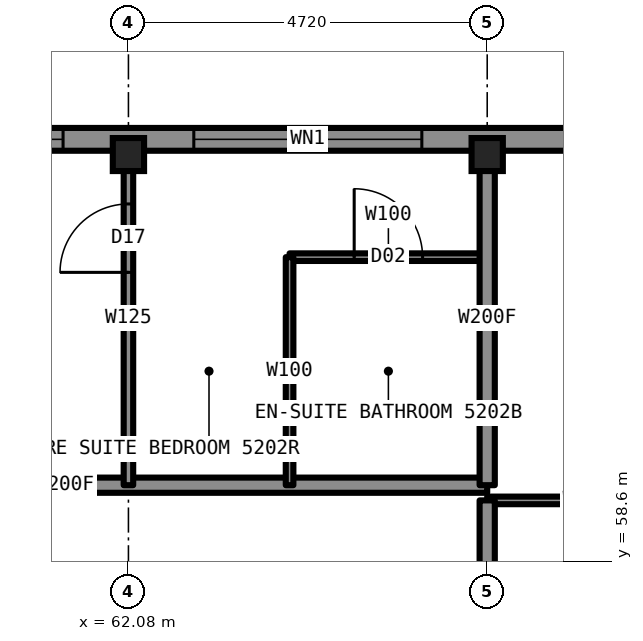
"""IFC4 building model, lengths in metres.
Left out: names, types, materials, properties, quantities, classifications, styles, units other than length and angle.
Written with IfcOpenShell. Run it as: python <this file> out.ifc"""

import sys

from ifc_helpers import new_model, si_unit, direction, frame, frame_2d, origin, origin_2d, place, context, subcontext, project, spatial, rectangle, i_section, extrude, element, fill, save


model = new_model("IFC4")
c1 = context("Model", 3, precision=1e-05, world=origin(), true_north=direction((0.0, 1.0)))
c2 = subcontext(c1, "Body", "Model", "MODEL_VIEW")
j1 = project(units=[si_unit("LENGTHUNIT", "METRE"), si_unit("PLANEANGLEUNIT", "RADIAN")], contexts=[c1])
p1 = place(None, origin())
s1 = spatial("IfcSite", under=j1, at=p1, CompositionType="ELEMENT")
p2 = place(p1, origin())
s2 = spatial("IfcBuilding", under=s1, at=p2, CompositionType="ELEMENT")
p3 = place(p2, frame((0.0, 0.0, 193.3)))
s3 = spatial("IfcBuildingStorey", under=s2, at=p3, CompositionType="ELEMENT", Elevation=193.3)
for number, where, z_axis, x_axis in (
    (1, (62.08, 63.95, 0.0), (0.0, 0.0, 1.0), (1.0, 0.0, 0.0)),
    (2, (66.8, 63.95, 0.0), (0.0, 0.0, 1.0), (1.0, 0.0, 0.0)),
):
    element("IfcColumn", number, at=place(p3, frame(where, z_axis=z_axis, x_axis=x_axis)), inside=s3, PredefinedType="COLUMN", context=c2, shape_type="SweptSolid", body=[
        extrude(i_section(OverallWidth=0.411, OverallDepth=0.434, WebThickness=0.036, FlangeThickness=0.057, at=origin_2d()), origin(), (0.0, 0.0, 1.0), 3.5),
    ])
p4 = place(p3, frame((66.8, 59.4, 0.0), z_axis=(0.0, 0.0, 1.0), x_axis=(1.0, 0.0, 0.0)))
e3 = element("IfcWall", 3, at=p4, inside=s3, PredefinedType="PARTITIONING", context=c2, shape_type="SweptSolid", body=[
    extrude(rectangle(XDim=2.6, YDim=0.1, at=frame_2d((1.3, 0.0))), origin(), (0.0, 0.0, 1.0), 3.33),
])
p5 = place(p3, frame((43.2, 59.6, 0.0), z_axis=(0.0, 0.0, 1.0), x_axis=(1.0, 0.0, 0.0)))
e4 = element("IfcWall", 4, at=p5, inside=s3, PredefinedType="PARTITIONING", context=c2, shape_type="SweptSolid", body=[
    extrude(rectangle(XDim=23.6, YDim=0.2, at=frame_2d((11.8, 0.0))), origin(), (0.0, 0.0, 1.0), 3.33),
])
p6 = place(p5, frame((3.0, 0.0, 0.0)))
e5 = element("IfcOpeningElement", 5, at=p6, cuts=e4, PredefinedType="OPENING", context=c2, shape_type="SweptSolid", body=[
    extrude(rectangle(XDim=1.0, YDim=2.2, at=frame_2d((0.5, 1.1))), frame((0.0, 0.11, 0.0), z_axis=(0.0, -1.0, 0.0), x_axis=(1.0, 0.0, 0.0)), (0.0, 0.0, 1.0), 0.22),
])
p7 = place(p5, frame((11.29, 0.0, 0.0)))
e6 = element("IfcOpeningElement", 6, at=p7, cuts=e4, PredefinedType="OPENING", context=c2, shape_type="SweptSolid", body=[
    extrude(rectangle(XDim=1.1, YDim=2.2, at=frame_2d((0.55, 1.1))), frame((0.0, 0.11, 0.0), z_axis=(0.0, -1.0, 0.0), x_axis=(1.0, 0.0, 0.0)), (0.0, 0.0, 1.0), 0.22),
])
p8 = place(p3, frame((64.2, 62.6, 0.0), z_axis=(0.0, 0.0, 1.0), x_axis=(1.0, 0.0, 0.0)))
e7 = element("IfcWall", 7, at=p8, inside=s3, PredefinedType="PARTITIONING", context=c2, shape_type="SweptSolid", body=[
    extrude(rectangle(XDim=2.6, YDim=0.1, at=frame_2d((1.3, 0.0))), origin(), (0.0, 0.0, 1.0), 3.33),
])
p9 = place(p8, frame((0.85, 0.0, 0.0)))
e8 = element("IfcOpeningElement", 8, at=p9, cuts=e7, PredefinedType="OPENING", context=c2, shape_type="SweptSolid", body=[
    extrude(rectangle(XDim=0.9, YDim=2.1, at=frame_2d((0.45, 1.05))), frame((0.0, 0.06, 0.0), z_axis=(0.0, -1.0, 0.0), x_axis=(1.0, 0.0, 0.0)), (0.0, 0.0, 1.0), 0.12),
])
p10 = place(p3, frame((66.8, 59.6, 0.0), z_axis=(0.0, 0.0, 1.0), x_axis=(0.0, 1.0, 0.0)))
e9 = element("IfcWall", 9, at=p10, inside=s3, PredefinedType="PARTITIONING", context=c2, shape_type="SweptSolid", body=[
    extrude(rectangle(XDim=4.4, YDim=0.2, at=frame_2d((2.2, 0.0))), origin(), (0.0, 0.0, 1.0), 2.573),
])
p11 = place(p3, frame((62.08, 59.6, 0.0), z_axis=(0.0, 0.0, 1.0), x_axis=(0.0, 1.0, 0.0)))
e10 = element("IfcWall", 10, at=p11, inside=s3, PredefinedType="PARTITIONING", context=c2, shape_type="SweptSolid", body=[
    extrude(rectangle(XDim=4.4, YDim=0.125, at=frame_2d((2.2, 0.0))), origin(), (0.0, 0.0, 1.0), 2.573),
])
p12 = place(p11, frame((2.8, 0.0, 0.0)))
e11 = element("IfcOpeningElement", 11, at=p12, cuts=e10, PredefinedType="OPENING", context=c2, shape_type="SweptSolid", body=[
    extrude(rectangle(XDim=0.9, YDim=2.2, at=frame_2d((0.45, 1.1))), frame((0.0, 0.073, 0.0), z_axis=(0.0, -1.0, 0.0), x_axis=(1.0, 0.0, 0.0)), (0.0, 0.0, 1.0), 0.145),
])
p13 = place(p3, frame((64.2, 59.6, 0.0), z_axis=(0.0, 0.0, 1.0), x_axis=(0.0, 1.0, 0.0)))
e12 = element("IfcWall", 12, at=p13, inside=s3, PredefinedType="PARTITIONING", context=c2, shape_type="SweptSolid", body=[
    extrude(rectangle(XDim=3.0, YDim=0.1, at=frame_2d((1.5, 0.0))), origin(), (0.0, 0.0, 1.0), 3.33),
])
p14 = place(p3, frame((68.8, 64.15, 0.0), z_axis=(0.0, 0.0, 1.0), x_axis=(-1.0, 0.0, 0.0)))
e13 = element("IfcWall", 13, at=p14, inside=s3, PredefinedType="SOLIDWALL", context=c2, shape_type="SweptSolid", body=[
    extrude(rectangle(XDim=27.6, YDim=0.3, at=frame_2d((13.8, 0.0))), origin(), (0.0, 0.0, 1.0), 2.83),
])
p15 = place(p14, frame((2.86, 0.0, 0.3)))
e14 = element("IfcOpeningElement", 14, at=p15, cuts=e13, PredefinedType="OPENING", context=c2, shape_type="SweptSolid", body=[
    extrude(rectangle(XDim=3.0, YDim=2.0, at=frame_2d((1.5, 1.0))), frame((0.0, 0.16, 0.0), z_axis=(0.0, -1.0, 0.0), x_axis=(1.0, 0.0, 0.0)), (0.0, 0.0, 1.0), 0.32),
])
p16 = place(p14, frame((7.58, 0.0, 0.3)))
e15 = element("IfcOpeningElement", 15, at=p16, cuts=e13, PredefinedType="OPENING", context=c2, shape_type="SweptSolid", body=[
    extrude(rectangle(XDim=2.5, YDim=2.0, at=frame_2d((1.25, 1.0))), frame((0.0, 0.16, 0.0), z_axis=(0.0, -1.0, 0.0), x_axis=(1.0, 0.0, 0.0)), (0.0, 0.0, 1.0), 0.32),
])
p17 = place(p14, frame((12.95, 0.0, 1.0)))
e16 = element("IfcOpeningElement", 16, at=p17, cuts=e13, PredefinedType="OPENING", context=c2, shape_type="SweptSolid", body=[
    extrude(rectangle(XDim=1.7, YDim=1.3, at=frame_2d((0.85, 0.65))), frame((0.0, 0.16, 0.0), z_axis=(0.0, -1.0, 0.0), x_axis=(1.0, 0.0, 0.0)), (0.0, 0.0, 1.0), 0.32),
])
p18 = place(p14, frame((17.52, 0.0, 0.3)))
e17 = element("IfcOpeningElement", 17, at=p18, cuts=e13, PredefinedType="OPENING", context=c2, shape_type="SweptSolid", body=[
    extrude(rectangle(XDim=2.5, YDim=2.0, at=frame_2d((1.25, 1.0))), frame((0.0, 0.16, 0.0), z_axis=(0.0, -1.0, 0.0), x_axis=(1.0, 0.0, 0.0)), (0.0, 0.0, 1.0), 0.32),
])
p19 = place(p14, frame((21.74, 0.0, 0.3)))
e18 = element("IfcOpeningElement", 18, at=p19, cuts=e13, PredefinedType="OPENING", context=c2, shape_type="SweptSolid", body=[
    extrude(rectangle(XDim=3.0, YDim=2.0, at=frame_2d((1.5, 1.0))), frame((0.0, 0.16, 0.0), z_axis=(0.0, -1.0, 0.0), x_axis=(1.0, 0.0, 0.0)), (0.0, 0.0, 1.0), 0.32),
])
p20 = place(p3, frame((66.8, 56.78, 0.0), z_axis=(0.0, 0.0, 1.0), x_axis=(0.0, 1.0, 0.0)))
e19 = element("IfcWall", 19, at=p20, inside=s3, PredefinedType="PARTITIONING", context=c2, shape_type="SweptSolid", body=[
    extrude(rectangle(XDim=2.62, YDim=0.2, at=frame_2d((1.31, 0.0))), origin(), (0.0, 0.0, 1.0), 2.573),
])
p21 = place(p9, origin())
e20 = element("IfcDoor", 20, at=p21, inside=s3, OperationType="SINGLE_SWING_RIGHT", PredefinedType="DOOR", context=c2, shape_type="SweptSolid", body=[
    extrude(rectangle(XDim=0.9, YDim=2.1, at=frame_2d((0.45, 1.05))), frame((0.0, 0.025, 0.0), z_axis=(0.0, -1.0, 0.0), x_axis=(1.0, 0.0, 0.0)), (0.0, 0.0, 1.0), 0.05),
])
fill(e8, e20)
p22 = place(p12, origin())
e21 = element("IfcDoor", 21, at=p22, inside=s3, OperationType="SINGLE_SWING_LEFT", PredefinedType="DOOR", context=c2, shape_type="SweptSolid", body=[
    extrude(rectangle(XDim=0.9, YDim=2.2, at=frame_2d((0.45, 1.1))), frame((0.0, 0.025, 0.0), z_axis=(0.0, -1.0, 0.0), x_axis=(1.0, 0.0, 0.0)), (0.0, 0.0, 1.0), 0.05),
])
fill(e11, e21)
p23 = place(p15, origin())
e22 = element("IfcWindow", 22, at=p23, inside=s3, PartitioningType="SINGLE_PANEL", PredefinedType="WINDOW", context=c2, shape_type="SweptSolid", body=[
    extrude(rectangle(XDim=3.0, YDim=2.0, at=frame_2d((1.5, 1.0))), frame((0.0, 0.13, 0.0), z_axis=(0.0, -1.0, 0.0), x_axis=(1.0, 0.0, 0.0)), (0.0, 0.0, 1.0), 0.06),
])
fill(e14, e22)
p24 = place(p16, origin())
e23 = element("IfcWindow", 23, at=p24, inside=s3, PartitioningType="SINGLE_PANEL", PredefinedType="WINDOW", context=c2, shape_type="SweptSolid", body=[
    extrude(rectangle(XDim=2.5, YDim=2.0, at=frame_2d((1.25, 1.0))), frame((0.0, 0.13, 0.0), z_axis=(0.0, -1.0, 0.0), x_axis=(1.0, 0.0, 0.0)), (0.0, 0.0, 1.0), 0.06),
])
fill(e15, e23)
save(model, sys.argv[1])
